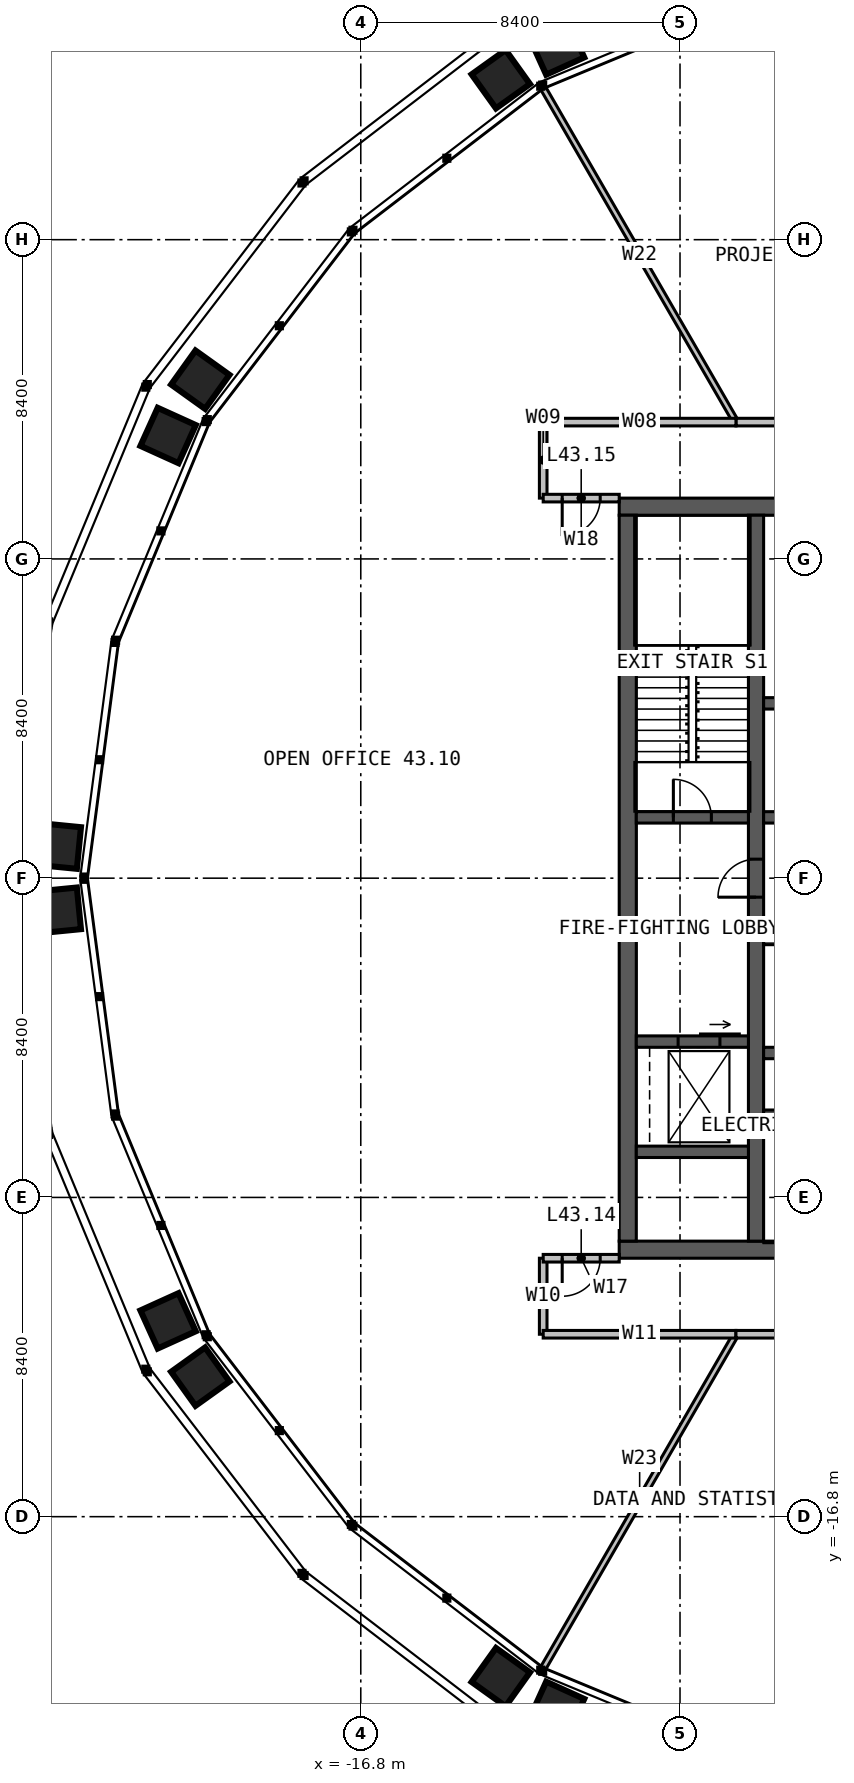
"""IFC4 building model, lengths in metres.
Left out: names, types, materials, properties, quantities, classifications, styles, units other than length and angle.
Written with IfcOpenShell. Run it as: python <this file> out.ifc"""

import sys

from ifc_helpers import new_model, si_unit, direction, frame, frame_2d, origin, place, context, subcontext, project, spatial, rectangle, extrude, element, fill, save


model = new_model("IFC4")
c1 = context("Model", 3, precision=1e-05, world=origin(), true_north=direction((0.0, 1.0)))
c2 = subcontext(c1, "Body", "Model", "MODEL_VIEW")
j1 = project(units=[si_unit("LENGTHUNIT", "METRE"), si_unit("PLANEANGLEUNIT", "RADIAN")], contexts=[c1])
p1 = place(None, origin())
s1 = spatial("IfcSite", under=j1, at=p1, CompositionType="ELEMENT")
p2 = place(p1, origin())
s2 = spatial("IfcBuilding", under=s1, at=p2, CompositionType="ELEMENT")
p3 = place(p2, frame((0.0, 0.0, 179.0)))
s3 = spatial("IfcBuildingStorey", under=s2, at=p3, CompositionType="ELEMENT", Elevation=179.0)
p4 = place(p3, frame((-10.0, 9.775, 0.0), z_axis=(0.0, 0.0, 1.0), x_axis=(1.0, 0.0, 0.0)))
e1 = element("IfcWall", 1, at=p4, inside=s3, PredefinedType="SOLIDWALL", context=c2, shape_type="SweptSolid", body=[
    extrude(rectangle(XDim=20.0, YDim=0.45, at=frame_2d((10.0, 0.0))), origin(), (0.0, 0.0, 1.0), 4.0),
])
p5 = place(p4, frame((9.4, 0.0, 0.0)))
e2 = element("IfcOpeningElement", 2, at=p5, cuts=e1, PredefinedType="OPENING", context=c2, shape_type="SweptSolid", body=[
    extrude(rectangle(XDim=1.2, YDim=2.2, at=frame_2d((0.6, 1.1))), frame((0.0, 0.235, 0.0), z_axis=(0.0, -1.0, 0.0), x_axis=(1.0, 0.0, 0.0)), (0.0, 0.0, 1.0), 0.47),
])
p6 = place(p3, frame((10.0, -9.775, 0.0), z_axis=(0.0, 0.0, 1.0), x_axis=(-1.0, 0.0, 0.0)))
e3 = element("IfcWall", 3, at=p6, inside=s3, PredefinedType="SOLIDWALL", context=c2, shape_type="SweptSolid", body=[
    extrude(rectangle(XDim=20.0, YDim=0.45, at=frame_2d((10.0, 0.0))), origin(), (0.0, 0.0, 1.0), 4.0),
])
p7 = place(p6, frame((6.875, 0.0, 0.0)))
e4 = element("IfcOpeningElement", 4, at=p7, cuts=e3, PredefinedType="OPENING", context=c2, shape_type="SweptSolid", body=[
    extrude(rectangle(XDim=1.2, YDim=2.2, at=frame_2d((0.6, 1.1))), frame((0.0, 0.235, 0.0), z_axis=(0.0, -1.0, 0.0), x_axis=(1.0, 0.0, 0.0)), (0.0, 0.0, 1.0), 0.47),
])
p8 = place(p3, frame((-9.775, 9.55, 0.0), z_axis=(0.0, 0.0, 1.0), x_axis=(0.0, -1.0, 0.0)))
e5 = element("IfcWall", 5, at=p8, inside=s3, PredefinedType="SOLIDWALL", context=c2, shape_type="SweptSolid", body=[
    extrude(rectangle(XDim=19.1, YDim=0.45, at=frame_2d((9.55, 0.0))), origin(), (0.0, 0.0, 1.0), 4.0),
])
p9 = place(p3, frame((-6.4, -9.55, 0.0), z_axis=(0.0, 0.0, 1.0), x_axis=(0.0, 1.0, 0.0)))
e6 = element("IfcWall", 6, at=p9, inside=s3, PredefinedType="SOLIDWALL", context=c2, shape_type="SweptSolid", body=[
    extrude(rectangle(XDim=19.1, YDim=0.4, at=frame_2d((9.55, 0.0))), origin(), (0.0, 0.0, 1.0), 4.0),
])
p10 = place(p9, frame((9.05, 0.0, 0.0)))
e7 = element("IfcOpeningElement", 7, at=p10, cuts=e6, PredefinedType="OPENING", context=c2, shape_type="SweptSolid", body=[
    extrude(rectangle(XDim=1.0, YDim=2.2, at=frame_2d((0.5, 1.1))), frame((0.0, 0.21, 0.0), z_axis=(0.0, -1.0, 0.0), x_axis=(1.0, 0.0, 0.0)), (0.0, 0.0, 1.0), 0.42),
])
p11 = place(p3, frame((-6.2, 1.6, 0.0), z_axis=(0.0, 0.0, 1.0), x_axis=(1.0, 0.0, 0.0)))
e8 = element("IfcWall", 8, at=p11, inside=s3, PredefinedType="SOLIDWALL", context=c2, shape_type="SweptSolid", body=[
    extrude(rectangle(XDim=4.85, YDim=0.3, at=frame_2d((2.425, 0.0))), origin(), (0.0, 0.0, 1.0), 4.0),
])
p12 = place(p11, frame((0.625, 0.0, 0.0)))
e9 = element("IfcOpeningElement", 9, at=p12, cuts=e8, PredefinedType="OPENING", context=c2, shape_type="SweptSolid", body=[
    extrude(rectangle(XDim=1.1, YDim=2.2, at=frame_2d((0.55, 1.1))), frame((0.0, 0.16, 0.0), z_axis=(0.0, -1.0, 0.0), x_axis=(1.0, 0.0, 0.0)), (0.0, 0.0, 1.0), 0.32),
])
p13 = place(p11, frame((3.15, 0.0, 0.0)))
e10 = element("IfcOpeningElement", 10, at=p13, cuts=e8, PredefinedType="OPENING", context=c2, shape_type="SweptSolid", body=[
    extrude(rectangle(XDim=1.1, YDim=2.2, at=frame_2d((0.55, 1.1))), frame((0.0, 0.16, 0.0), z_axis=(0.0, -1.0, 0.0), x_axis=(1.0, 0.0, 0.0)), (0.0, 0.0, 1.0), 0.32),
])
p14 = place(p3, frame((-6.2, 4.6, 0.0), z_axis=(0.0, 0.0, 1.0), x_axis=(1.0, 0.0, 0.0)))
e11 = element("IfcWall", 11, at=p14, inside=s3, PredefinedType="SOLIDWALL", context=c2, shape_type="SweptSolid", body=[
    extrude(rectangle(XDim=4.85, YDim=0.3, at=frame_2d((2.425, 0.0))), origin(), (0.0, 0.0, 1.0), 4.0),
])
for number, where, z_axis, x_axis in (
    (12, (-6.2, -1.6, 0.0), (0.0, 0.0, 1.0), (1.0, 0.0, 0.0)),
    (13, (-6.2, -4.6, 0.0), (0.0, 0.0, 1.0), (1.0, 0.0, 0.0)),
):
    element("IfcWall", number, at=place(p3, frame(where, z_axis=z_axis, x_axis=x_axis)), inside=s3, PredefinedType="SOLIDWALL", context=c2, shape_type="SweptSolid", body=[
        extrude(rectangle(XDim=7.4, YDim=0.3, at=frame_2d((3.7, 0.0))), origin(), (0.0, 0.0, 1.0), 4.0),
    ])
p15 = place(p3, frame((-6.2, -6.2, 0.0), z_axis=(0.0, 0.0, 1.0), x_axis=(1.0, 0.0, 0.0)))
e14 = element("IfcWall", 14, at=p15, inside=s3, PredefinedType="SOLIDWALL", context=c2, shape_type="SweptSolid", body=[
    extrude(rectangle(XDim=7.4, YDim=0.2, at=frame_2d((3.7, 0.0))), origin(), (0.0, 0.0, 1.0), 4.0),
])
p16 = place(p3, frame((-9.55, 1.6, 0.0), z_axis=(0.0, 0.0, 1.0), x_axis=(1.0, 0.0, 0.0)))
e15 = element("IfcWall", 15, at=p16, inside=s3, PredefinedType="SOLIDWALL", context=c2, shape_type="SweptSolid", body=[
    extrude(rectangle(XDim=2.95, YDim=0.3, at=frame_2d((1.475, 0.0))), origin(), (0.0, 0.0, 1.0), 4.0),
])
p17 = place(p16, frame((0.975, 0.0, 0.0)))
e16 = element("IfcOpeningElement", 16, at=p17, cuts=e15, PredefinedType="OPENING", context=c2, shape_type="SweptSolid", body=[
    extrude(rectangle(XDim=1.0, YDim=2.2, at=frame_2d((0.5, 1.1))), frame((0.0, 0.16, 0.0), z_axis=(0.0, -1.0, 0.0), x_axis=(1.0, 0.0, 0.0)), (0.0, 0.0, 1.0), 0.32),
])
p18 = place(p3, frame((-9.55, -4.3, 0.0), z_axis=(0.0, 0.0, 1.0), x_axis=(1.0, 0.0, 0.0)))
e17 = element("IfcWall", 17, at=p18, inside=s3, PredefinedType="SOLIDWALL", context=c2, shape_type="SweptSolid", body=[
    extrude(rectangle(XDim=2.95, YDim=0.3, at=frame_2d((1.475, 0.0))), origin(), (0.0, 0.0, 1.0), 4.0),
])
p19 = place(p18, frame((1.1, 0.0, 0.0)))
e18 = element("IfcOpeningElement", 18, at=p19, cuts=e17, PredefinedType="OPENING", context=c2, shape_type="SweptSolid", body=[
    extrude(rectangle(XDim=1.1, YDim=2.2, at=frame_2d((0.55, 1.1))), frame((0.0, 0.16, 0.0), z_axis=(0.0, -1.0, 0.0), x_axis=(1.0, 0.0, 0.0)), (0.0, 0.0, 1.0), 0.32),
])
p20 = place(p3, frame((-9.55, -7.2, 0.0), z_axis=(0.0, 0.0, 1.0), x_axis=(1.0, 0.0, 0.0)))
e19 = element("IfcWall", 19, at=p20, inside=s3, PredefinedType="SOLIDWALL", context=c2, shape_type="SweptSolid", body=[
    extrude(rectangle(XDim=2.95, YDim=0.3, at=frame_2d((1.475, 0.0))), origin(), (0.0, 0.0, 1.0), 4.0),
])
for number, where, z_axis, x_axis in (
    (20, (-6.928, 12.0, 0.0), (0.0, 0.0, 1.0), (-0.5, 0.866, 0.0)),
    (21, (-6.928, -12.0, 0.0), (0.0, 0.0, 1.0), (-0.5, -0.866, 0.0)),
):
    element("IfcWall", number, at=place(p3, frame(where, z_axis=z_axis, x_axis=x_axis)), inside=s3, PredefinedType="PARTITIONING", context=c2, shape_type="SweptSolid", body=[
        extrude(rectangle(XDim=10.136, YDim=0.15, at=frame_2d((5.068, 0.0))), origin(), (0.0, 0.0, 1.0), 2.79),
    ])
p21 = place(p3, frame((0.0, 12.0, 0.0), z_axis=(0.0, 0.0, 1.0), x_axis=(-1.0, 0.0, 0.0)))
e22 = element("IfcWall", 22, at=p21, inside=s3, PredefinedType="PARTITIONING", context=c2, shape_type="SweptSolid", body=[
    extrude(rectangle(XDim=6.928, YDim=0.2, at=frame_2d((3.464, 0.0))), origin(), (0.0, 0.0, 1.0), 3.8),
])
p22 = place(p21, frame((2.964, 0.0, 0.0)))
e23 = element("IfcOpeningElement", 23, at=p22, cuts=e22, PredefinedType="OPENING", context=c2, shape_type="SweptSolid", body=[
    extrude(rectangle(XDim=1.0, YDim=2.2, at=frame_2d((0.5, 1.1))), frame((0.0, 0.11, 0.0), z_axis=(0.0, -1.0, 0.0), x_axis=(1.0, 0.0, 0.0)), (0.0, 0.0, 1.0), 0.22),
])
p23 = place(p3, frame((-6.928, 12.0, 0.0), z_axis=(0.0, 0.0, 1.0), x_axis=(-1.0, 0.0, 0.0)))
e24 = element("IfcWall", 24, at=p23, inside=s3, PredefinedType="PARTITIONING", context=c2, shape_type="SweptSolid", body=[
    extrude(rectangle(XDim=5.072, YDim=0.2, at=frame_2d((2.536, 0.0))), origin(), (0.0, 0.0, 1.0), 3.8),
])
for number, where, z_axis, x_axis in (
    (25, (-12.0, 12.0, 0.0), (0.0, 0.0, 1.0), (0.0, -1.0, 0.0)),
    (26, (-12.0, -10.0, 0.0), (0.0, 0.0, 1.0), (0.0, -1.0, 0.0)),
):
    element("IfcWall", number, at=place(p3, frame(where, z_axis=z_axis, x_axis=x_axis)), inside=s3, PredefinedType="PARTITIONING", context=c2, shape_type="SweptSolid", body=[
        extrude(rectangle(XDim=2.0, YDim=0.2, at=frame_2d((1.0, 0.0))), origin(), (0.0, 0.0, 1.0), 3.8),
    ])
p24 = place(p3, frame((-12.0, -12.0, 0.0), z_axis=(0.0, 0.0, 1.0), x_axis=(1.0, 0.0, 0.0)))
e27 = element("IfcWall", 27, at=p24, inside=s3, PredefinedType="PARTITIONING", context=c2, shape_type="SweptSolid", body=[
    extrude(rectangle(XDim=5.072, YDim=0.2, at=frame_2d((2.536, 0.0))), origin(), (0.0, 0.0, 1.0), 3.8),
])
p25 = place(p3, frame((-6.928, -12.0, 0.0), z_axis=(0.0, 0.0, 1.0), x_axis=(1.0, 0.0, 0.0)))
e28 = element("IfcWall", 28, at=p25, inside=s3, PredefinedType="PARTITIONING", context=c2, shape_type="SweptSolid", body=[
    extrude(rectangle(XDim=5.348, YDim=0.2, at=frame_2d((2.674, 0.0))), origin(), (0.0, 0.0, 1.0), 3.8),
])
p26 = place(p25, frame((1.774, 0.0, 0.0)))
e29 = element("IfcOpeningElement", 29, at=p26, cuts=e28, PredefinedType="OPENING", context=c2, shape_type="SweptSolid", body=[
    extrude(rectangle(XDim=1.8, YDim=2.2, at=frame_2d((0.9, 1.1))), frame((0.0, 0.11, 0.0), z_axis=(0.0, -1.0, 0.0), x_axis=(1.0, 0.0, 0.0)), (0.0, 0.0, 1.0), 0.22),
])
p27 = place(p3, frame((-10.0, -10.0, 0.0), z_axis=(0.0, 0.0, 1.0), x_axis=(-1.0, 0.0, 0.0)))
e30 = element("IfcWall", 30, at=p27, inside=s3, PredefinedType="PARTITIONING", context=c2, shape_type="SweptSolid", body=[
    extrude(rectangle(XDim=2.0, YDim=0.2, at=frame_2d((1.0, 0.0))), origin(), (0.0, 0.0, 1.0), 3.8),
])
p28 = place(p27, frame((0.5, 0.0, 0.0)))
e31 = element("IfcOpeningElement", 31, at=p28, cuts=e30, PredefinedType="OPENING", context=c2, shape_type="SweptSolid", body=[
    extrude(rectangle(XDim=1.0, YDim=2.2, at=frame_2d((0.5, 1.1))), frame((0.0, 0.11, 0.0), z_axis=(0.0, -1.0, 0.0), x_axis=(1.0, 0.0, 0.0)), (0.0, 0.0, 1.0), 0.22),
])
p29 = place(p3, frame((-10.0, 10.0, 0.0), z_axis=(0.0, 0.0, 1.0), x_axis=(-1.0, 0.0, 0.0)))
e32 = element("IfcWall", 32, at=p29, inside=s3, PredefinedType="PARTITIONING", context=c2, shape_type="SweptSolid", body=[
    extrude(rectangle(XDim=2.0, YDim=0.2, at=frame_2d((1.0, 0.0))), origin(), (0.0, 0.0, 1.0), 3.8),
])
p30 = place(p29, frame((0.5, 0.0, 0.0)))
e33 = element("IfcOpeningElement", 33, at=p30, cuts=e32, PredefinedType="OPENING", context=c2, shape_type="SweptSolid", body=[
    extrude(rectangle(XDim=1.0, YDim=2.2, at=frame_2d((0.5, 1.1))), frame((0.0, 0.11, 0.0), z_axis=(0.0, -1.0, 0.0), x_axis=(1.0, 0.0, 0.0)), (0.0, 0.0, 1.0), 0.22),
])
p31 = place(p10, origin())
e34 = element("IfcDoor", 34, at=p31, inside=s3, OperationType="SINGLE_SWING_LEFT", PredefinedType="DOOR", context=c2, shape_type="SweptSolid", body=[
    extrude(rectangle(XDim=1.0, YDim=2.2, at=frame_2d((0.5, 1.1))), frame((0.0, 0.025, 0.0), z_axis=(0.0, -1.0, 0.0), x_axis=(1.0, 0.0, 0.0)), (0.0, 0.0, 1.0), 0.05),
])
fill(e7, e34)
p32 = place(p17, origin())
e35 = element("IfcDoor", 35, at=p32, inside=s3, OperationType="SINGLE_SWING_LEFT", PredefinedType="DOOR", context=c2, shape_type="SweptSolid", body=[
    extrude(rectangle(XDim=1.0, YDim=2.2, at=frame_2d((0.5, 1.1))), frame((0.0, 0.025, 0.0), z_axis=(0.0, -1.0, 0.0), x_axis=(1.0, 0.0, 0.0)), (0.0, 0.0, 1.0), 0.05),
])
fill(e16, e35)
p33 = place(p19, origin())
e36 = element("IfcDoor", 36, at=p33, inside=s3, OperationType="SLIDING_TO_LEFT", PredefinedType="DOOR", context=c2, shape_type="SweptSolid", body=[
    extrude(rectangle(XDim=1.1, YDim=2.2, at=frame_2d((0.55, 1.1))), frame((0.0, 0.025, 0.0), z_axis=(0.0, -1.0, 0.0), x_axis=(1.0, 0.0, 0.0)), (0.0, 0.0, 1.0), 0.05),
])
fill(e18, e36)
p34 = place(p28, origin())
e37 = element("IfcDoor", 37, at=p34, inside=s3, OperationType="SINGLE_SWING_RIGHT", PredefinedType="DOOR", context=c2, shape_type="SweptSolid", body=[
    extrude(rectangle(XDim=1.0, YDim=2.2, at=frame_2d((0.5, 1.1))), frame((0.0, 0.025, 0.0), z_axis=(0.0, -1.0, 0.0), x_axis=(1.0, 0.0, 0.0)), (0.0, 0.0, 1.0), 0.05),
])
fill(e31, e37)
p35 = place(p30, origin())
e38 = element("IfcDoor", 38, at=p35, inside=s3, OperationType="SINGLE_SWING_RIGHT", PredefinedType="DOOR", context=c2, shape_type="SweptSolid", body=[
    extrude(rectangle(XDim=1.0, YDim=2.2, at=frame_2d((0.5, 1.1))), frame((0.0, 0.025, 0.0), z_axis=(0.0, -1.0, 0.0), x_axis=(1.0, 0.0, 0.0)), (0.0, 0.0, 1.0), 0.05),
])
fill(e33, e38)
save(model, sys.argv[1])
